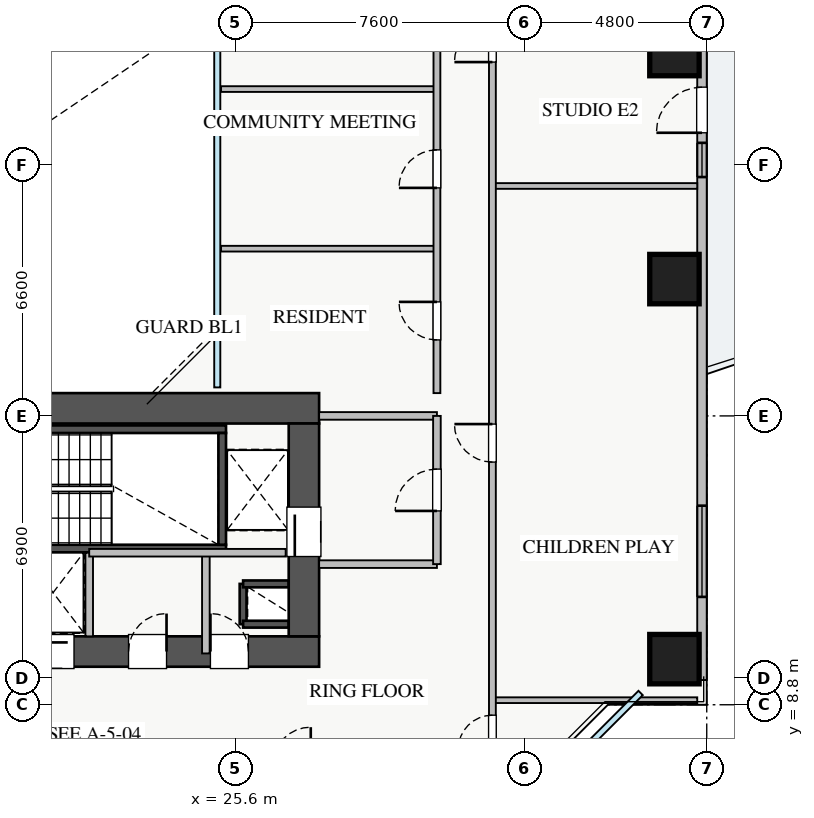
"""IFC4 building model, lengths in metres.
Left out: names, types, materials, properties, quantities, classifications, styles, units other than length and angle.
Written with IfcOpenShell. Run it as: python <this file> out.ifc"""

import sys

from ifc_helpers import new_model, si_unit, direction, frame, frame_2d, origin, origin_2d, place, context, subcontext, project, spatial, rectangle, extrude, source, transform, mapped, element, fill, save


model = new_model("IFC4")
c1 = context("Model", 3, precision=1e-05, world=origin(), true_north=direction((0.0, 1.0)))
c2 = subcontext(c1, "Body", "Model", "MODEL_VIEW")
j1 = project(units=[si_unit("LENGTHUNIT", "METRE"), si_unit("PLANEANGLEUNIT", "RADIAN")], contexts=[c1])
p1 = place(None, origin())
s1 = spatial("IfcSite", under=j1, at=p1, CompositionType="ELEMENT")
p2 = place(p1, origin())
s2 = spatial("IfcBuilding", under=s1, at=p2, CompositionType="ELEMENT")
p3 = place(p2, frame((0.0, 0.0, 60.0)))
s3 = spatial("IfcBuildingStorey", under=s2, at=p3, CompositionType="ELEMENT", Elevation=60.0)
p4 = place(p3, frame((25.8, 10.92, 0.0), z_axis=(0.0, 0.0, 1.0), x_axis=(0.0, 1.0, 0.0)))
e1 = element("IfcWall", 1, at=p4, inside=s3, PredefinedType="SHEAR", context=c2, shape_type="SweptSolid", body=[
    extrude(rectangle(XDim=1.06, YDim=0.18, at=frame_2d((0.53, 0.0))), origin(), (0.0, 0.0, 1.0), 3.07),
])
for number, where, z_axis, x_axis in (
    (2, (25.8, 11.98, 0.0), (0.0, 0.0, 1.0), (1.0, 0.0, 0.0)),
    (3, (25.8, 10.92, 0.0), (0.0, 0.0, 1.0), (1.0, 0.0, 0.0)),
):
    element("IfcWall", number, at=place(p3, frame(where, z_axis=z_axis, x_axis=x_axis)), inside=s3, PredefinedType="SHEAR", context=c2, shape_type="SweptSolid", body=[
        extrude(rectangle(XDim=1.2, YDim=0.18, at=frame_2d((0.6, 0.0))), origin(), (0.0, 0.0, 1.0), 3.07),
    ])
p5 = place(p3, frame((19.88, 12.8, 0.0), z_axis=(0.0, 0.0, 1.0), x_axis=(1.0, 0.0, 0.0)))
e4 = element("IfcWall", 4, at=p5, inside=s3, PredefinedType="SHEAR", context=c2, shape_type="SweptSolid", body=[
    extrude(rectangle(XDim=1.87, YDim=0.18, at=frame_2d((0.935, 0.0))), origin(), (0.0, 0.0, 1.0), 3.07),
])
p6 = place(p3, frame((18.2, 12.91, 0.0), z_axis=(0.0, 0.0, 1.0), x_axis=(1.0, 0.0, 0.0)))
e5 = element("IfcWall", 5, at=p6, inside=s3, PredefinedType="SHEAR", context=c2, shape_type="SweptSolid", body=[
    extrude(rectangle(XDim=7.15, YDim=0.2, at=frame_2d((3.575, 0.0))), origin(), (0.0, 0.0, 1.0), 3.25),
])
p7 = place(p6, frame((0.35, 0.0, 0.0)))
e6 = element("IfcOpeningElement", 6, at=p7, cuts=e5, PredefinedType="OPENING", context=c2, shape_type="SweptSolid", body=[
    extrude(rectangle(XDim=1.1, YDim=2.05, at=frame_2d((0.55, 1.025))), frame((0.0, 0.11, 0.0), z_axis=(0.0, -1.0, 0.0), x_axis=(1.0, 0.0, 0.0)), (0.0, 0.0, 1.0), 0.22),
])
p8 = place(p3, frame((18.2, 16.05, 0.0), z_axis=(0.0, 0.0, 1.0), x_axis=(1.0, 0.0, 0.0)))
e7 = element("IfcWall", 7, at=p8, inside=s3, PredefinedType="SHEAR", context=c2, shape_type="SweptSolid", body=[
    extrude(rectangle(XDim=7.15, YDim=0.2, at=frame_2d((3.575, 0.0))), origin(), (0.0, 0.0, 1.0), 3.25),
])
p9 = place(p3, frame((25.25, 13.01, 0.0), z_axis=(0.0, 0.0, 1.0), x_axis=(0.0, 1.0, 0.0)))
e8 = element("IfcWall", 8, at=p9, inside=s3, PredefinedType="SHEAR", context=c2, shape_type="SweptSolid", body=[
    extrude(rectangle(XDim=2.94, YDim=0.2, at=frame_2d((1.47, 0.0))), origin(), (0.0, 0.0, 1.0), 3.25),
])
p10 = place(p3, frame((10.2, 10.2, 0.0), z_axis=(0.0, 0.0, 1.0), x_axis=(1.0, 0.0, 0.0)))
e9 = element("IfcWall", 9, at=p10, inside=s3, PredefinedType="SHEAR", context=c2, shape_type="SweptSolid", body=[
    extrude(rectangle(XDim=17.6, YDim=0.8, at=frame_2d((8.8, 0.0))), origin(), (0.0, 0.0, 1.0), 3.25),
])
p11 = place(p10, frame((1.15, 0.0, 0.0)))
e10 = element("IfcOpeningElement", 10, at=p11, cuts=e9, PredefinedType="OPENING", context=c2, shape_type="SweptSolid", body=[
    extrude(rectangle(XDim=1.1, YDim=2.05, at=frame_2d((0.55, 1.025))), frame((0.0, 0.41, 0.0), z_axis=(0.0, -1.0, 0.0), x_axis=(1.0, 0.0, 0.0)), (0.0, 0.0, 1.0), 0.82),
])
p12 = place(p10, frame((8.3, 0.0, 0.0)))
e11 = element("IfcOpeningElement", 11, at=p12, cuts=e9, PredefinedType="OPENING", context=c2, shape_type="SweptSolid", body=[
    extrude(rectangle(XDim=1.1, YDim=2.05, at=frame_2d((0.55, 1.025))), frame((0.0, 0.41, 0.0), z_axis=(0.0, -1.0, 0.0), x_axis=(1.0, 0.0, 0.0)), (0.0, 0.0, 1.0), 0.82),
])
p13 = place(p10, frame((10.05, 0.0, 0.0)))
e12 = element("IfcOpeningElement", 12, at=p13, cuts=e9, PredefinedType="OPENING", context=c2, shape_type="SweptSolid", body=[
    extrude(rectangle(XDim=1.1, YDim=2.05, at=frame_2d((0.55, 1.025))), frame((0.0, 0.41, 0.0), z_axis=(0.0, -1.0, 0.0), x_axis=(1.0, 0.0, 0.0)), (0.0, 0.0, 1.0), 0.82),
])
p14 = place(p10, frame((14.74, 0.0, 0.0)))
e13 = element("IfcOpeningElement", 13, at=p14, cuts=e9, PredefinedType="OPENING", context=c2, shape_type="SweptSolid", body=[
    extrude(rectangle(XDim=1.0, YDim=2.05, at=frame_2d((0.5, 1.025))), frame((0.0, 0.41, 0.0), z_axis=(0.0, -1.0, 0.0), x_axis=(1.0, 0.0, 0.0)), (0.0, 0.0, 1.0), 0.82),
])
p15 = place(p10, frame((12.585, 0.0, 0.0)))
e14 = element("IfcOpeningElement", 14, at=p15, cuts=e9, PredefinedType="OPENING", context=c2, shape_type="SweptSolid", body=[
    extrude(rectangle(XDim=1.0, YDim=2.05, at=frame_2d((0.5, 1.025))), frame((0.0, 0.41, 0.0), z_axis=(0.0, -1.0, 0.0), x_axis=(1.0, 0.0, 0.0)), (0.0, 0.0, 1.0), 0.82),
])
p16 = place(p3, frame((10.2, 16.6, 0.0), z_axis=(0.0, 0.0, 1.0), x_axis=(1.0, 0.0, 0.0)))
e15 = element("IfcWall", 15, at=p16, inside=s3, PredefinedType="SHEAR", context=c2, shape_type="SweptSolid", body=[
    extrude(rectangle(XDim=17.6, YDim=0.8, at=frame_2d((8.8, 0.0))), origin(), (0.0, 0.0, 1.0), 3.25),
])
p17 = place(p3, frame((27.4, 10.6, 0.0), z_axis=(0.0, 0.0, 1.0), x_axis=(0.0, 1.0, 0.0)))
e16 = element("IfcWall", 16, at=p17, inside=s3, PredefinedType="SHEAR", context=c2, shape_type="SweptSolid", body=[
    extrude(rectangle(XDim=5.6, YDim=0.8, at=frame_2d((2.8, 0.0))), origin(), (0.0, 0.0, 1.0), 3.25),
])
p18 = place(p17, frame((2.1, 0.0, 0.0)))
e17 = element("IfcOpeningElement", 17, at=p18, cuts=e16, PredefinedType="OPENING", context=c2, shape_type="SweptSolid", body=[
    extrude(rectangle(XDim=1.3, YDim=2.05, at=frame_2d((0.65, 1.025))), frame((0.0, 0.41, 0.0), z_axis=(0.0, -1.0, 0.0), x_axis=(1.0, 0.0, 0.0)), (0.0, 0.0, 1.0), 0.82),
])
m1 = source(origin(), c2, "Body", "SweptSolid", [
    extrude(rectangle(XDim=1.3, YDim=1.3, at=origin_2d()), origin(), (0.0, 0.0, 1.0), 3.25),
])
for number, where, z_axis, x_axis in (
    (18, (37.15, 10.0, 0.0), (0.0, 0.0, 1.0), (1.0, 0.0, 0.0)),
    (19, (37.15, 20.0, 0.0), (0.0, 0.0, 1.0), (1.0, 0.0, 0.0)),
    (20, (37.15, 26.0, 0.0), (0.0, 0.0, 1.0), (1.0, 0.0, 0.0)),
):
    element("IfcColumn", number, at=place(p3, frame(where, z_axis=z_axis, x_axis=x_axis)), inside=s3, PredefinedType="COLUMN", context=c2, shape_type="MappedRepresentation", body=[
        mapped(m1, transform((0.0, 0.0, 0.0), x_axis=(1.0, 0.0, 0.0), y_axis=(0.0, 1.0, 0.0), z_axis=(0.0, 0.0, 1.0), scale=1.0)),
    ])
p19 = place(p3, frame((37.875, 9.45, 0.0), z_axis=(0.0, 0.0, 1.0), x_axis=(0.0, 1.0, 0.0)))
e21 = element("IfcWall", 21, at=p19, inside=s3, PredefinedType="STANDARD", context=c2, shape_type="SweptSolid", body=[
    extrude(rectangle(XDim=27.1, YDim=0.25, at=frame_2d((13.55, 0.0))), origin(), (0.0, 0.0, 1.0), 2.61),
])
p20 = place(p19, frame((14.4, 0.0, 0.0)))
e22 = element("IfcOpeningElement", 22, at=p20, cuts=e21, PredefinedType="OPENING", context=c2, shape_type="SweptSolid", body=[
    extrude(rectangle(XDim=1.2, YDim=2.1, at=frame_2d((0.6, 1.05))), frame((0.0, 0.135, 0.0), z_axis=(0.0, -1.0, 0.0), x_axis=(1.0, 0.0, 0.0)), (0.0, 0.0, 1.0), 0.27),
])
p21 = place(p19, frame((2.188, 0.0, 0.9)))
e23 = element("IfcOpeningElement", 23, at=p21, cuts=e21, PredefinedType="OPENING", context=c2, shape_type="SweptSolid", body=[
    extrude(rectangle(XDim=2.4, YDim=1.48, at=frame_2d((1.2, 0.74))), frame((0.0, 0.135, 0.0), z_axis=(0.0, -1.0, 0.0), x_axis=(1.0, 0.0, 0.0)), (0.0, 0.0, 1.0), 0.27),
])
p22 = place(p19, frame((22.663, 0.0, 0.9)))
e24 = element("IfcOpeningElement", 24, at=p22, cuts=e21, PredefinedType="OPENING", context=c2, shape_type="SweptSolid", body=[
    extrude(rectangle(XDim=2.1, YDim=1.48, at=frame_2d((1.05, 0.74))), frame((0.0, 0.135, 0.0), z_axis=(0.0, -1.0, 0.0), x_axis=(1.0, 0.0, 0.0)), (0.0, 0.0, 1.0), 0.27),
])
p23 = place(p19, frame((13.235, 0.0, 0.9)))
e25 = element("IfcOpeningElement", 25, at=p23, cuts=e21, PredefinedType="OPENING", context=c2, shape_type="SweptSolid", body=[
    extrude(rectangle(XDim=0.9, YDim=1.2, at=frame_2d((0.45, 0.6))), frame((0.0, 0.135, 0.0), z_axis=(0.0, -1.0, 0.0), x_axis=(1.0, 0.0, 0.0)), (0.0, 0.0, 1.0), 0.27),
])
for number, where, z_axis, x_axis in (
    (26, (27.8, 16.4, 0.0), (0.0, 0.0, 1.0), (1.0, 0.0, 0.0)),
    (27, (27.8, 12.5, 0.0), (0.0, 0.0, 1.0), (1.0, 0.0, 0.0)),
):
    element("IfcWall", number, at=place(p3, frame(where, z_axis=z_axis, x_axis=x_axis)), inside=s3, PredefinedType="PARTITIONING", context=c2, shape_type="SweptSolid", body=[
        extrude(rectangle(XDim=3.1, YDim=0.2, at=frame_2d((1.55, 0.0))), origin(), (0.0, 0.0, 1.0), 3.07),
    ])
p24 = place(p3, frame((30.9, 12.5, 0.0), z_axis=(0.0, 0.0, 1.0), x_axis=(0.0, 1.0, 0.0)))
e28 = element("IfcWall", 28, at=p24, inside=s3, PredefinedType="PARTITIONING", context=c2, shape_type="SweptSolid", body=[
    extrude(rectangle(XDim=3.9, YDim=0.2, at=frame_2d((1.95, 0.0))), origin(), (0.0, 0.0, 1.0), 3.07),
])
p25 = place(p24, frame((1.4, 0.0, 0.0)))
e29 = element("IfcOpeningElement", 29, at=p25, cuts=e28, PredefinedType="OPENING", context=c2, shape_type="SweptSolid", body=[
    extrude(rectangle(XDim=1.1, YDim=2.05, at=frame_2d((0.55, 1.025))), frame((0.0, 0.11, 0.0), z_axis=(0.0, -1.0, 0.0), x_axis=(1.0, 0.0, 0.0)), (0.0, 0.0, 1.0), 0.22),
])
p26 = place(p3, frame((24.82, 10.15, 0.0), z_axis=(0.0, 0.0, 1.0), x_axis=(0.0, 1.0, 0.0)))
e30 = element("IfcWall", 30, at=p26, inside=s3, PredefinedType="PARTITIONING", context=c2, shape_type="SweptSolid", body=[
    extrude(rectangle(XDim=2.65, YDim=0.2, at=frame_2d((1.325, 0.0))), origin(), (0.0, 0.0, 1.0), 3.07),
])
p27 = place(p3, frame((21.75, 10.6, 0.0), z_axis=(0.0, 0.0, 1.0), x_axis=(0.0, 1.0, 0.0)))
e31 = element("IfcWall", 31, at=p27, inside=s3, PredefinedType="PARTITIONING", context=c2, shape_type="SweptSolid", body=[
    extrude(rectangle(XDim=2.2, YDim=0.2, at=frame_2d((1.1, 0.0))), origin(), (0.0, 0.0, 1.0), 3.07),
])
p28 = place(p3, frame((21.75, 12.8, 0.0), z_axis=(0.0, 0.0, 1.0), x_axis=(1.0, 0.0, 0.0)))
e32 = element("IfcWall", 32, at=p28, inside=s3, PredefinedType="PARTITIONING", context=c2, shape_type="SweptSolid", body=[
    extrude(rectangle(XDim=5.17, YDim=0.2, at=frame_2d((2.585, 0.0))), origin(), (0.0, 0.0, 1.0), 3.07),
])
for number, where, z_axis, x_axis in (
    (33, (32.36, 8.92, 0.0), (0.0, 0.0, 1.0), (1.0, 0.0, 0.0)),
    (34, (32.36, 22.45, 0.0), (0.0, 0.0, 1.0), (1.0, 0.0, 0.0)),
):
    element("IfcWall", number, at=place(p3, frame(where, z_axis=z_axis, x_axis=x_axis)), inside=s3, PredefinedType="PARTITIONING", context=c2, shape_type="SweptSolid", body=[
        extrude(rectangle(XDim=5.39, YDim=0.15, at=frame_2d((2.695, 0.0))), origin(), (0.0, 0.0, 1.0), 3.07),
    ])
p29 = place(p3, frame((32.36, 7.21, 0.0), z_axis=(0.0, 0.0, 1.0), x_axis=(0.0, 1.0, 0.0)))
e35 = element("IfcWall", 35, at=p29, inside=s3, PredefinedType="PARTITIONING", context=c2, shape_type="SweptSolid", body=[
    extrude(rectangle(XDim=31.23, YDim=0.18, at=frame_2d((15.615, 0.0))), origin(), (0.0, 0.0, 1.0), 2.821),
])
p30 = place(p29, frame((30.09, 0.0, 0.0)))
e36 = element("IfcOpeningElement", 36, at=p30, cuts=e35, PredefinedType="OPENING", context=c2, shape_type="SweptSolid", body=[
    extrude(rectangle(XDim=0.9, YDim=2.05, at=frame_2d((0.45, 1.025))), frame((0.0, 0.1, 0.0), z_axis=(0.0, -1.0, 0.0), x_axis=(1.0, 0.0, 0.0)), (0.0, 0.0, 1.0), 0.2),
])
p31 = place(p29, frame((0.415, 0.0, 0.0)))
e37 = element("IfcOpeningElement", 37, at=p31, cuts=e35, PredefinedType="OPENING", context=c2, shape_type="SweptSolid", body=[
    extrude(rectangle(XDim=0.9, YDim=2.05, at=frame_2d((0.45, 1.025))), frame((0.0, 0.1, 0.0), z_axis=(0.0, -1.0, 0.0), x_axis=(1.0, 0.0, 0.0)), (0.0, 0.0, 1.0), 0.2),
])
p32 = place(p29, frame((7.975, 0.0, 0.0)))
e38 = element("IfcOpeningElement", 38, at=p32, cuts=e35, PredefinedType="OPENING", context=c2, shape_type="SweptSolid", body=[
    extrude(rectangle(XDim=1.0, YDim=2.05, at=frame_2d((0.5, 1.025))), frame((0.0, 0.1, 0.0), z_axis=(0.0, -1.0, 0.0), x_axis=(1.0, 0.0, 0.0)), (0.0, 0.0, 1.0), 0.2),
])
p33 = place(p29, frame((18.5, 0.0, 0.0)))
e39 = element("IfcOpeningElement", 39, at=p33, cuts=e35, PredefinedType="OPENING", context=c2, shape_type="SweptSolid", body=[
    extrude(rectangle(XDim=1.0, YDim=2.05, at=frame_2d((0.5, 1.025))), frame((0.0, 0.1, 0.0), z_axis=(0.0, -1.0, 0.0), x_axis=(1.0, 0.0, 0.0)), (0.0, 0.0, 1.0), 0.2),
])
for number, where, z_axis, x_axis in (
    (40, (25.22, 20.8, 0.0), (0.0, 0.0, 1.0), (1.0, 0.0, 0.0)),
    (41, (25.22, 25.0, 0.0), (0.0, 0.0, 1.0), (1.0, 0.0, 0.0)),
):
    element("IfcWall", number, at=place(p3, frame(where, z_axis=z_axis, x_axis=x_axis)), inside=s3, PredefinedType="PARTITIONING", context=c2, shape_type="SweptSolid", body=[
        extrude(rectangle(XDim=5.68, YDim=0.15, at=frame_2d((2.84, 0.0))), origin(), (0.0, 0.0, 1.0), 3.07),
    ])
p34 = place(p3, frame((30.9, 17.0, 0.0), z_axis=(0.0, 0.0, 1.0), x_axis=(0.0, 1.0, 0.0)))
e42 = element("IfcWall", 42, at=p34, inside=s3, PredefinedType="PARTITIONING", context=c2, shape_type="SweptSolid", body=[
    extrude(rectangle(XDim=12.0, YDim=0.18, at=frame_2d((6.0, 0.0))), origin(), (0.0, 0.0, 1.0), 3.07),
])
p35 = place(p34, frame((1.4, 0.0, 0.0)))
e43 = element("IfcOpeningElement", 43, at=p35, cuts=e42, PredefinedType="OPENING", context=c2, shape_type="SweptSolid", body=[
    extrude(rectangle(XDim=1.0, YDim=2.05, at=frame_2d((0.5, 1.025))), frame((0.0, 0.1, 0.0), z_axis=(0.0, -1.0, 0.0), x_axis=(1.0, 0.0, 0.0)), (0.0, 0.0, 1.0), 0.2),
])
p36 = place(p34, frame((5.4, 0.0, 0.0)))
e44 = element("IfcOpeningElement", 44, at=p36, cuts=e42, PredefinedType="OPENING", context=c2, shape_type="SweptSolid", body=[
    extrude(rectangle(XDim=1.0, YDim=2.05, at=frame_2d((0.5, 1.025))), frame((0.0, 0.1, 0.0), z_axis=(0.0, -1.0, 0.0), x_axis=(1.0, 0.0, 0.0)), (0.0, 0.0, 1.0), 0.2),
])
p37 = place(p34, frame((9.4, 0.0, 0.0)))
e45 = element("IfcOpeningElement", 45, at=p37, cuts=e42, PredefinedType="OPENING", context=c2, shape_type="SweptSolid", body=[
    extrude(rectangle(XDim=1.0, YDim=2.05, at=frame_2d((0.5, 1.025))), frame((0.0, 0.1, 0.0), z_axis=(0.0, -1.0, 0.0), x_axis=(1.0, 0.0, 0.0)), (0.0, 0.0, 1.0), 0.2),
])
m2 = source(origin(), c2, "Body", "SweptSolid", [
    extrude(rectangle(XDim=1.2, YDim=2.1, at=frame_2d((0.6, 1.05))), frame((0.0, 0.025, 0.0), z_axis=(0.0, -1.0, 0.0), x_axis=(1.0, 0.0, 0.0)), (0.0, 0.0, 1.0), 0.05),
])
p38 = place(p20, origin())
e46 = element("IfcDoor", 46, at=p38, inside=s3, OperationType="SINGLE_SWING_LEFT", PredefinedType="DOOR", context=c2, shape_type="MappedRepresentation", body=[
    mapped(m2, transform((0.0, 0.0, 0.0), x_axis=(1.0, 0.0, 0.0), y_axis=(0.0, 1.0, 0.0), z_axis=(0.0, 0.0, 1.0), scale=1.0)),
])
fill(e22, e46)
m3 = source(origin(), c2, "Body", "SweptSolid", [
    extrude(rectangle(XDim=2.4, YDim=1.48, at=frame_2d((1.2, 0.74))), frame((0.0, 0.03, 0.0), z_axis=(0.0, -1.0, 0.0), x_axis=(1.0, 0.0, 0.0)), (0.0, 0.0, 1.0), 0.06),
])
p39 = place(p21, origin())
e47 = element("IfcWindow", 47, at=p39, inside=s3, PartitioningType="TRIPLE_PANEL_VERTICAL", PredefinedType="WINDOW", context=c2, shape_type="MappedRepresentation", body=[
    mapped(m3, transform((0.0, 0.0, 0.0), x_axis=(1.0, 0.0, 0.0), y_axis=(0.0, 1.0, 0.0), z_axis=(0.0, 0.0, 1.0), scale=1.0)),
])
fill(e23, e47)
m4 = source(origin(), c2, "Body", "SweptSolid", [
    extrude(rectangle(XDim=1.3, YDim=2.05, at=frame_2d((0.65, 1.025))), frame((0.0, 0.025, 0.0), z_axis=(0.0, -1.0, 0.0), x_axis=(1.0, 0.0, 0.0)), (0.0, 0.0, 1.0), 0.05),
])
p40 = place(p18, origin())
e48 = element("IfcDoor", 48, at=p40, inside=s3, OperationType="SLIDING_TO_RIGHT", PredefinedType="DOOR", context=c2, shape_type="MappedRepresentation", body=[
    mapped(m4, transform((0.0, 0.0, 0.0), x_axis=(1.0, 0.0, 0.0), y_axis=(0.0, 1.0, 0.0), z_axis=(0.0, 0.0, 1.0), scale=1.0)),
])
fill(e17, e48)
m5 = source(origin(), c2, "Body", "SweptSolid", [
    extrude(rectangle(XDim=1.1, YDim=2.05, at=frame_2d((0.55, 1.025))), frame((0.0, 0.025, 0.0), z_axis=(0.0, -1.0, 0.0), x_axis=(1.0, 0.0, 0.0)), (0.0, 0.0, 1.0), 0.05),
])
p41 = place(p13, origin())
e49 = element("IfcDoor", 49, at=p41, inside=s3, OperationType="SLIDING_TO_RIGHT", PredefinedType="DOOR", context=c2, shape_type="MappedRepresentation", body=[
    mapped(m5, transform((0.0, 0.0, 0.0), x_axis=(1.0, 0.0, 0.0), y_axis=(0.0, 1.0, 0.0), z_axis=(0.0, 0.0, 1.0), scale=1.0)),
])
fill(e12, e49)
m6 = source(origin(), c2, "Body", "SweptSolid", [
    extrude(rectangle(XDim=1.0, YDim=2.05, at=frame_2d((0.5, 1.025))), frame((0.0, 0.025, 0.0), z_axis=(0.0, -1.0, 0.0), x_axis=(1.0, 0.0, 0.0)), (0.0, 0.0, 1.0), 0.05),
])
p42 = place(p14, origin())
e50 = element("IfcDoor", 50, at=p42, inside=s3, OperationType="SINGLE_SWING_LEFT", PredefinedType="DOOR", context=c2, shape_type="MappedRepresentation", body=[
    mapped(m6, transform((0.0, 0.0, 0.0), x_axis=(1.0, 0.0, 0.0), y_axis=(0.0, 1.0, 0.0), z_axis=(0.0, 0.0, 1.0), scale=1.0)),
])
fill(e13, e50)
p43 = place(p15, origin())
e51 = element("IfcDoor", 51, at=p43, inside=s3, OperationType="SINGLE_SWING_RIGHT", PredefinedType="DOOR", context=c2, shape_type="MappedRepresentation", body=[
    mapped(m6, transform((0.0, 0.0, 0.0), x_axis=(1.0, 0.0, 0.0), y_axis=(0.0, 1.0, 0.0), z_axis=(0.0, 0.0, 1.0), scale=1.0)),
])
fill(e14, e51)
p44 = place(p25, origin())
e52 = element("IfcDoor", 52, at=p44, inside=s3, OperationType="SINGLE_SWING_LEFT", PredefinedType="DOOR", context=c2, shape_type="MappedRepresentation", body=[
    mapped(m5, transform((0.0, 0.0, 0.0), x_axis=(1.0, 0.0, 0.0), y_axis=(0.0, 1.0, 0.0), z_axis=(0.0, 0.0, 1.0), scale=1.0)),
])
fill(e29, e52)
m7 = source(origin(), c2, "Body", "SweptSolid", [
    extrude(rectangle(XDim=0.9, YDim=2.05, at=frame_2d((0.45, 1.025))), frame((0.0, 0.025, 0.0), z_axis=(0.0, -1.0, 0.0), x_axis=(1.0, 0.0, 0.0)), (0.0, 0.0, 1.0), 0.05),
])
p45 = place(p31, origin())
e53 = element("IfcDoor", 53, at=p45, inside=s3, OperationType="SINGLE_SWING_LEFT", PredefinedType="DOOR", context=c2, shape_type="MappedRepresentation", body=[
    mapped(m7, transform((0.0, 0.0, 0.0), x_axis=(1.0, 0.0, 0.0), y_axis=(0.0, 1.0, 0.0), z_axis=(0.0, 0.0, 1.0), scale=1.0)),
])
fill(e37, e53)
p46 = place(p32, origin())
e54 = element("IfcDoor", 54, at=p46, inside=s3, OperationType="SINGLE_SWING_RIGHT", PredefinedType="DOOR", context=c2, shape_type="MappedRepresentation", body=[
    mapped(m6, transform((0.0, 0.0, 0.0), x_axis=(1.0, 0.0, 0.0), y_axis=(0.0, 1.0, 0.0), z_axis=(0.0, 0.0, 1.0), scale=1.0)),
])
fill(e38, e54)
p47 = place(p33, origin())
e55 = element("IfcDoor", 55, at=p47, inside=s3, OperationType="SINGLE_SWING_LEFT", PredefinedType="DOOR", context=c2, shape_type="MappedRepresentation", body=[
    mapped(m6, transform((0.0, 0.0, 0.0), x_axis=(1.0, 0.0, 0.0), y_axis=(0.0, 1.0, 0.0), z_axis=(0.0, 0.0, 1.0), scale=1.0)),
])
fill(e39, e55)
p48 = place(p35, origin())
e56 = element("IfcDoor", 56, at=p48, inside=s3, OperationType="SINGLE_SWING_RIGHT", PredefinedType="DOOR", context=c2, shape_type="MappedRepresentation", body=[
    mapped(m6, transform((0.0, 0.0, 0.0), x_axis=(1.0, 0.0, 0.0), y_axis=(0.0, 1.0, 0.0), z_axis=(0.0, 0.0, 1.0), scale=1.0)),
])
fill(e43, e56)
p49 = place(p36, origin())
e57 = element("IfcDoor", 57, at=p49, inside=s3, OperationType="SINGLE_SWING_LEFT", PredefinedType="DOOR", context=c2, shape_type="MappedRepresentation", body=[
    mapped(m6, transform((0.0, 0.0, 0.0), x_axis=(1.0, 0.0, 0.0), y_axis=(0.0, 1.0, 0.0), z_axis=(0.0, 0.0, 1.0), scale=1.0)),
])
fill(e44, e57)
m8 = source(origin(), c2, "Body", "SweptSolid", [
    extrude(rectangle(XDim=0.9, YDim=1.2, at=frame_2d((0.45, 0.6))), frame((0.0, 0.03, 0.0), z_axis=(0.0, -1.0, 0.0), x_axis=(1.0, 0.0, 0.0)), (0.0, 0.0, 1.0), 0.06),
])
p50 = place(p23, origin())
e58 = element("IfcWindow", 58, at=p50, inside=s3, PartitioningType="SINGLE_PANEL", PredefinedType="WINDOW", context=c2, shape_type="MappedRepresentation", body=[
    mapped(m8, transform((0.0, 0.0, 0.0), x_axis=(1.0, 0.0, 0.0), y_axis=(0.0, 1.0, 0.0), z_axis=(0.0, 0.0, 1.0), scale=1.0)),
])
fill(e25, e58)
save(model, sys.argv[1])
